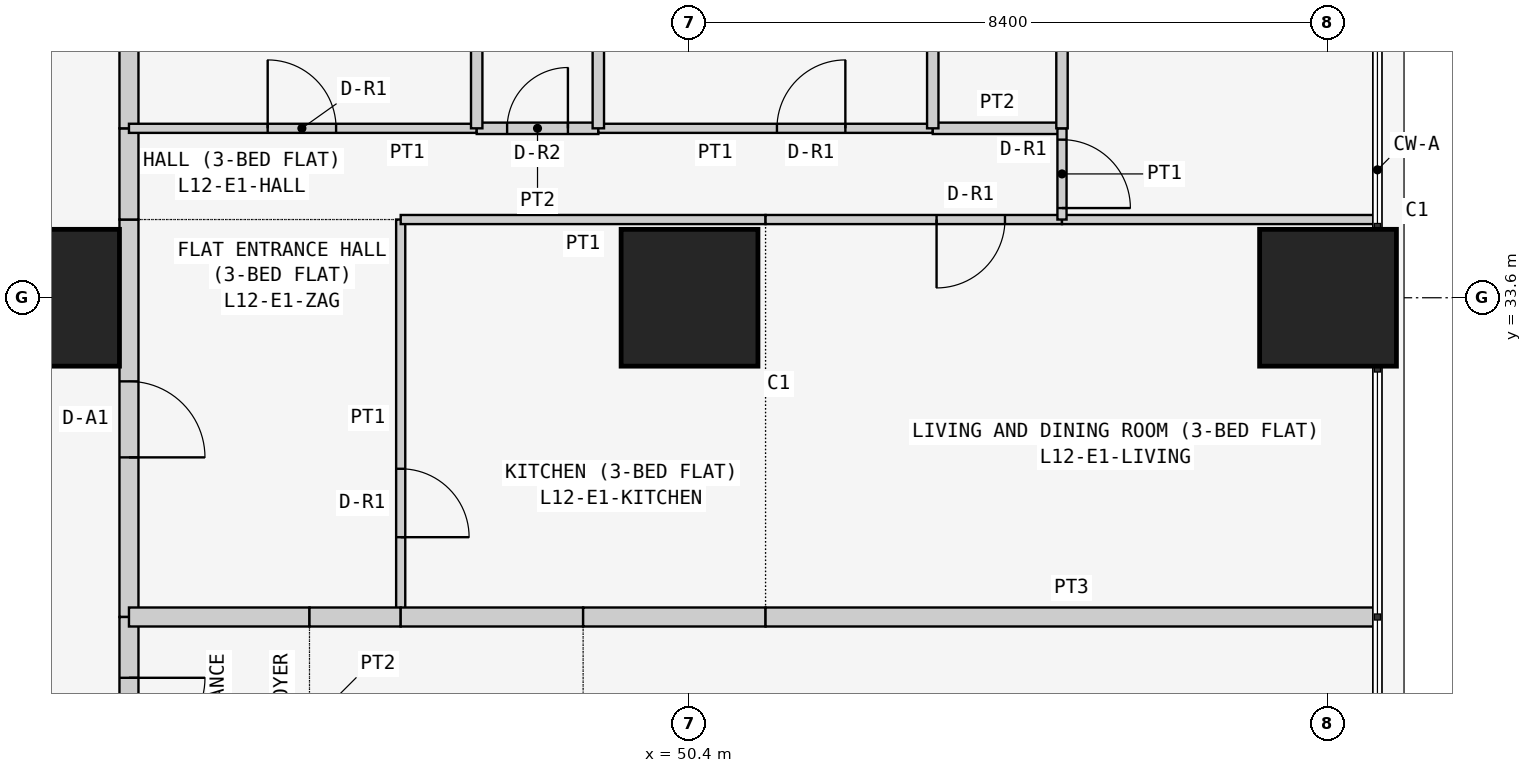
"""IFC4 building model, lengths in metres.
Left out: names, types, materials, properties, quantities, classifications, styles, units other than length and angle.
Written with IfcOpenShell. Run it as: python <this file> out.ifc"""

import sys

from ifc_helpers import new_model, si_unit, direction, frame, frame_2d, origin, origin_2d, place, context, subcontext, project, spatial, rectangle, extrude, element, fill, save


model = new_model("IFC4")
c1 = context("Model", 3, precision=1e-05, world=origin(), true_north=direction((0.0, 1.0)))
c2 = subcontext(c1, "Body", "Model", "MODEL_VIEW")
j1 = project(units=[si_unit("LENGTHUNIT", "METRE"), si_unit("PLANEANGLEUNIT", "RADIAN")], contexts=[c1])
p1 = place(None, origin())
s1 = spatial("IfcSite", under=j1, at=p1, CompositionType="ELEMENT")
p2 = place(p1, origin())
s2 = spatial("IfcBuilding", under=s1, at=p2, CompositionType="ELEMENT")
p3 = place(p2, frame((0.0, 0.0, 52.5)))
s3 = spatial("IfcBuildingStorey", under=s2, at=p3, CompositionType="ELEMENT", Elevation=52.5)
for number, where, z_axis, x_axis in (
    (1, (42.0, 33.6, 0.0), (0.0, 0.0, 1.0), (1.0, 0.0, 0.0)),
    (2, (50.4, 33.6, 0.0), (0.0, 0.0, 1.0), (1.0, 0.0, 0.0)),
    (3, (58.8, 33.6, 0.0), (0.0, 0.0, 1.0), (1.0, 0.0, 0.0)),
):
    element("IfcColumn", number, at=place(p3, frame(where, z_axis=z_axis, x_axis=x_axis)), inside=s3, PredefinedType="COLUMN", context=c2, shape_type="SweptSolid", body=[
        extrude(rectangle(XDim=1.8, YDim=1.8, at=origin_2d()), origin(), (0.0, 0.0, 1.0), 3.6),
    ])
p4 = place(p3, frame((43.025, 34.629, 0.0), z_axis=(0.0, 0.0, 1.0), x_axis=(0.0, -1.0, 0.0)))
e4 = element("IfcWall", 4, at=p4, inside=s3, PredefinedType="PARTITIONING", context=c2, shape_type="SweptSolid", body=[
    extrude(rectangle(XDim=5.229, YDim=0.25, at=frame_2d((2.615, 0.0))), origin(), (0.0, 0.0, 1.0), 3.45),
])
p5 = place(p4, frame((2.129, 0.0, 0.0)))
e5 = element("IfcOpeningElement", 5, at=p5, cuts=e4, PredefinedType="OPENING", context=c2, shape_type="SweptSolid", body=[
    extrude(rectangle(XDim=1.0, YDim=2.1, at=frame_2d((0.5, 1.05))), frame((0.0, 0.135, 0.0), z_axis=(0.0, -1.0, 0.0), x_axis=(1.0, 0.0, 0.0)), (0.0, 0.0, 1.0), 0.27),
])
p6 = place(p3, frame((43.025, 35.829, 0.0), z_axis=(0.0, 0.0, 1.0), x_axis=(0.0, -1.0, 0.0)))
e6 = element("IfcWall", 6, at=p6, inside=s3, PredefinedType="PARTITIONING", context=c2, shape_type="SweptSolid", body=[
    extrude(rectangle(XDim=1.2, YDim=0.25, at=frame_2d((0.6, 0.0))), origin(), (0.0, 0.0, 1.0), 3.45),
])
p7 = place(p3, frame((43.025, 42.7, 0.0), z_axis=(0.0, 0.0, 1.0), x_axis=(0.0, -1.0, 0.0)))
e7 = element("IfcWall", 7, at=p7, inside=s3, PredefinedType="PARTITIONING", context=c2, shape_type="SweptSolid", body=[
    extrude(rectangle(XDim=6.871, YDim=0.25, at=frame_2d((3.436, 0.0))), origin(), (0.0, 0.0, 1.0), 3.45),
])
p8 = place(p3, frame((43.025, 29.4, 0.0), z_axis=(0.0, 0.0, 1.0), x_axis=(0.0, -1.0, 0.0)))
e8 = element("IfcWall", 8, at=p8, inside=s3, PredefinedType="PARTITIONING", context=c2, shape_type="SweptSolid", body=[
    extrude(rectangle(XDim=2.6, YDim=0.25, at=frame_2d((1.3, 0.0))), origin(), (0.0, 0.0, 1.0), 3.45),
])
p9 = place(p8, frame((0.8, 0.0, 0.0)))
e9 = element("IfcOpeningElement", 9, at=p9, cuts=e8, PredefinedType="OPENING", context=c2, shape_type="SweptSolid", body=[
    extrude(rectangle(XDim=1.0, YDim=2.1, at=frame_2d((0.5, 1.05))), frame((0.0, 0.135, 0.0), z_axis=(0.0, -1.0, 0.0), x_axis=(1.0, 0.0, 0.0)), (0.0, 0.0, 1.0), 0.27),
])
p10 = place(p3, frame((46.6, 29.4, 0.0), z_axis=(0.0, 0.0, 1.0), x_axis=(0.0, 1.0, 0.0)))
e10 = element("IfcWall", 10, at=p10, inside=s3, PredefinedType="PARTITIONING", context=c2, shape_type="SweptSolid", body=[
    extrude(rectangle(XDim=5.229, YDim=0.12, at=frame_2d((2.615, 0.0))), origin(), (0.0, 0.0, 1.0), 3.45),
])
p11 = place(p10, frame((1.05, 0.0, 0.0)))
e11 = element("IfcOpeningElement", 11, at=p11, cuts=e10, PredefinedType="OPENING", context=c2, shape_type="SweptSolid", body=[
    extrude(rectangle(XDim=0.9, YDim=2.1, at=frame_2d((0.45, 1.05))), frame((0.0, 0.07, 0.0), z_axis=(0.0, -1.0, 0.0), x_axis=(1.0, 0.0, 0.0)), (0.0, 0.0, 1.0), 0.14),
])
p12 = place(p3, frame((43.025, 29.4, 0.0), z_axis=(0.0, 0.0, 1.0), x_axis=(1.0, 0.0, 0.0)))
e12 = element("IfcWall", 12, at=p12, inside=s3, PredefinedType="PARTITIONING", context=c2, shape_type="SweptSolid", body=[
    extrude(rectangle(XDim=2.375, YDim=0.25, at=frame_2d((1.188, 0.0))), origin(), (0.0, 0.0, 1.0), 3.45),
])
p13 = place(p3, frame((45.4, 29.4, 0.0), z_axis=(0.0, 0.0, 1.0), x_axis=(1.0, 0.0, 0.0)))
e13 = element("IfcWall", 13, at=p13, inside=s3, PredefinedType="PARTITIONING", context=c2, shape_type="SweptSolid", body=[
    extrude(rectangle(XDim=1.2, YDim=0.25, at=frame_2d((0.6, 0.0))), origin(), (0.0, 0.0, 1.0), 3.45),
])
p14 = place(p3, frame((51.4, 34.629, 0.0), z_axis=(0.0, 0.0, 1.0), x_axis=(-1.0, 0.0, 0.0)))
e14 = element("IfcWall", 14, at=p14, inside=s3, PredefinedType="PARTITIONING", context=c2, shape_type="SweptSolid", body=[
    extrude(rectangle(XDim=4.8, YDim=0.12, at=frame_2d((2.4, 0.0))), origin(), (0.0, 0.0, 1.0), 3.45),
])
for number, where, z_axis, x_axis in (
    (15, (46.6, 29.4, 0.0), (0.0, 0.0, 1.0), (1.0, 0.0, 0.0)),
    (16, (49.0, 29.4, 0.0), (0.0, 0.0, 1.0), (1.0, 0.0, 0.0)),
):
    element("IfcWall", number, at=place(p3, frame(where, z_axis=z_axis, x_axis=x_axis)), inside=s3, PredefinedType="PARTITIONING", context=c2, shape_type="SweptSolid", body=[
        extrude(rectangle(XDim=2.4, YDim=0.25, at=frame_2d((1.2, 0.0))), origin(), (0.0, 0.0, 1.0), 3.45),
    ])
p15 = place(p3, frame((55.3, 34.629, 0.0), z_axis=(0.0, 0.0, 1.0), x_axis=(-1.0, 0.0, 0.0)))
e17 = element("IfcWall", 17, at=p15, inside=s3, PredefinedType="PARTITIONING", context=c2, shape_type="SweptSolid", body=[
    extrude(rectangle(XDim=3.9, YDim=0.12, at=frame_2d((1.95, 0.0))), origin(), (0.0, 0.0, 1.0), 3.45),
])
p16 = place(p15, frame((0.75, 0.0, 0.0)))
e18 = element("IfcOpeningElement", 18, at=p16, cuts=e17, PredefinedType="OPENING", context=c2, shape_type="SweptSolid", body=[
    extrude(rectangle(XDim=0.9, YDim=2.1, at=frame_2d((0.45, 1.05))), frame((0.0, 0.07, 0.0), z_axis=(0.0, -1.0, 0.0), x_axis=(1.0, 0.0, 0.0)), (0.0, 0.0, 1.0), 0.14),
])
p17 = place(p3, frame((59.45, 34.629, 0.0), z_axis=(0.0, 0.0, 1.0), x_axis=(-1.0, 0.0, 0.0)))
e19 = element("IfcWall", 19, at=p17, inside=s3, PredefinedType="PARTITIONING", context=c2, shape_type="SweptSolid", body=[
    extrude(rectangle(XDim=4.15, YDim=0.12, at=frame_2d((2.075, 0.0))), origin(), (0.0, 0.0, 1.0), 3.45),
])
p18 = place(p3, frame((51.4, 29.4, 0.0), z_axis=(0.0, 0.0, 1.0), x_axis=(1.0, 0.0, 0.0)))
e20 = element("IfcWall", 20, at=p18, inside=s3, PredefinedType="PARTITIONING", context=c2, shape_type="SweptSolid", body=[
    extrude(rectangle(XDim=8.05, YDim=0.25, at=frame_2d((4.025, 0.0))), origin(), (0.0, 0.0, 1.0), 3.45),
])
p19 = place(p3, frame((47.6, 35.829, 0.0), z_axis=(0.0, 0.0, 1.0), x_axis=(-1.0, 0.0, 0.0)))
e21 = element("IfcWall", 21, at=p19, inside=s3, PredefinedType="PARTITIONING", context=c2, shape_type="SweptSolid", body=[
    extrude(rectangle(XDim=4.575, YDim=0.12, at=frame_2d((2.288, 0.0))), origin(), (0.0, 0.0, 1.0), 3.45),
])
p20 = place(p19, frame((1.85, 0.0, 0.0)))
e22 = element("IfcOpeningElement", 22, at=p20, cuts=e21, PredefinedType="OPENING", context=c2, shape_type="SweptSolid", body=[
    extrude(rectangle(XDim=0.9, YDim=2.1, at=frame_2d((0.45, 1.05))), frame((0.0, 0.07, 0.0), z_axis=(0.0, -1.0, 0.0), x_axis=(1.0, 0.0, 0.0)), (0.0, 0.0, 1.0), 0.14),
])
p21 = place(p3, frame((49.2, 35.829, 0.0), z_axis=(0.0, 0.0, 1.0), x_axis=(-1.0, 0.0, 0.0)))
e23 = element("IfcWall", 23, at=p21, inside=s3, PredefinedType="PARTITIONING", context=c2, shape_type="SweptSolid", body=[
    extrude(rectangle(XDim=1.6, YDim=0.15, at=frame_2d((0.8, 0.0))), origin(), (0.0, 0.0, 1.0), 3.45),
])
p22 = place(p21, frame((0.4, 0.0, 0.0)))
e24 = element("IfcOpeningElement", 24, at=p22, cuts=e23, PredefinedType="OPENING", context=c2, shape_type="SweptSolid", body=[
    extrude(rectangle(XDim=0.8, YDim=2.1, at=frame_2d((0.4, 1.05))), frame((0.0, 0.085, 0.0), z_axis=(0.0, -1.0, 0.0), x_axis=(1.0, 0.0, 0.0)), (0.0, 0.0, 1.0), 0.17),
])
p23 = place(p3, frame((53.6, 35.829, 0.0), z_axis=(0.0, 0.0, 1.0), x_axis=(-1.0, 0.0, 0.0)))
e25 = element("IfcWall", 25, at=p23, inside=s3, PredefinedType="PARTITIONING", context=c2, shape_type="SweptSolid", body=[
    extrude(rectangle(XDim=4.4, YDim=0.12, at=frame_2d((2.2, 0.0))), origin(), (0.0, 0.0, 1.0), 3.45),
])
p24 = place(p23, frame((1.15, 0.0, 0.0)))
e26 = element("IfcOpeningElement", 26, at=p24, cuts=e25, PredefinedType="OPENING", context=c2, shape_type="SweptSolid", body=[
    extrude(rectangle(XDim=0.9, YDim=2.1, at=frame_2d((0.45, 1.05))), frame((0.0, 0.07, 0.0), z_axis=(0.0, -1.0, 0.0), x_axis=(1.0, 0.0, 0.0)), (0.0, 0.0, 1.0), 0.14),
])
p25 = place(p3, frame((55.3, 35.829, 0.0), z_axis=(0.0, 0.0, 1.0), x_axis=(-1.0, 0.0, 0.0)))
e27 = element("IfcWall", 27, at=p25, inside=s3, PredefinedType="PARTITIONING", context=c2, shape_type="SweptSolid", body=[
    extrude(rectangle(XDim=1.7, YDim=0.15, at=frame_2d((0.85, 0.0))), origin(), (0.0, 0.0, 1.0), 3.45),
])
p26 = place(p3, frame((55.3, 34.629, 0.0), z_axis=(0.0, 0.0, 1.0), x_axis=(0.0, 1.0, 0.0)))
e28 = element("IfcWall", 28, at=p26, inside=s3, PredefinedType="PARTITIONING", context=c2, shape_type="SweptSolid", body=[
    extrude(rectangle(XDim=1.2, YDim=0.12, at=frame_2d((0.6, 0.0))), origin(), (0.0, 0.0, 1.0), 3.45),
])
p27 = place(p26, frame((0.151, 0.0, 0.0)))
e29 = element("IfcOpeningElement", 29, at=p27, cuts=e28, PredefinedType="OPENING", context=c2, shape_type="SweptSolid", body=[
    extrude(rectangle(XDim=0.9, YDim=2.1, at=frame_2d((0.45, 1.05))), frame((0.0, 0.07, 0.0), z_axis=(0.0, -1.0, 0.0), x_axis=(1.0, 0.0, 0.0)), (0.0, 0.0, 1.0), 0.14),
])
for number, where, z_axis, x_axis in (
    (30, (47.6, 35.829, 0.0), (0.0, 0.0, 1.0), (0.0, 1.0, 0.0)),
    (31, (49.2, 35.829, 0.0), (0.0, 0.0, 1.0), (0.0, 1.0, 0.0)),
    (32, (53.6, 35.829, 0.0), (0.0, 0.0, 1.0), (0.0, 1.0, 0.0)),
):
    element("IfcWall", number, at=place(p3, frame(where, z_axis=z_axis, x_axis=x_axis)), inside=s3, PredefinedType="PARTITIONING", context=c2, shape_type="SweptSolid", body=[
        extrude(rectangle(XDim=6.871, YDim=0.15, at=frame_2d((3.436, 0.0))), origin(), (0.0, 0.0, 1.0), 3.45),
    ])
p28 = place(p3, frame((55.3, 35.829, 0.0), z_axis=(0.0, 0.0, 1.0), x_axis=(0.0, 1.0, 0.0)))
e33 = element("IfcWall", 33, at=p28, inside=s3, PredefinedType="PARTITIONING", context=c2, shape_type="SweptSolid", body=[
    extrude(rectangle(XDim=6.871, YDim=0.15, at=frame_2d((3.436, 0.0))), origin(), (0.0, 0.0, 1.0), 3.45),
])
p29 = place(p28, frame((3.171, 0.0, 0.0)))
e34 = element("IfcOpeningElement", 34, at=p29, cuts=e33, PredefinedType="OPENING", context=c2, shape_type="SweptSolid", body=[
    extrude(rectangle(XDim=0.8, YDim=2.1, at=frame_2d((0.4, 1.05))), frame((0.0, 0.085, 0.0), z_axis=(0.0, -1.0, 0.0), x_axis=(1.0, 0.0, 0.0)), (0.0, 0.0, 1.0), 0.17),
])
p30 = place(p5, origin())
e35 = element("IfcDoor", 35, at=p30, inside=s3, OperationType="SINGLE_SWING_RIGHT", PredefinedType="DOOR", context=c2, shape_type="SweptSolid", body=[
    extrude(rectangle(XDim=1.0, YDim=2.1, at=frame_2d((0.5, 1.05))), frame((0.0, 0.025, 0.0), z_axis=(0.0, -1.0, 0.0), x_axis=(1.0, 0.0, 0.0)), (0.0, 0.0, 1.0), 0.05),
])
fill(e5, e35)
p31 = place(p11, frame((0.9, 0.0, 0.0), z_axis=(0.0, 0.0, 1.0), x_axis=(-1.0, 0.0, 0.0)))
e36 = element("IfcDoor", 36, at=p31, inside=s3, OperationType="SINGLE_SWING_RIGHT", PredefinedType="DOOR", context=c2, shape_type="SweptSolid", body=[
    extrude(rectangle(XDim=0.9, YDim=2.1, at=frame_2d((0.45, 1.05))), frame((0.0, 0.025, 0.0), z_axis=(0.0, -1.0, 0.0), x_axis=(1.0, 0.0, 0.0)), (0.0, 0.0, 1.0), 0.05),
])
fill(e11, e36)
p32 = place(p16, origin())
e37 = element("IfcDoor", 37, at=p32, inside=s3, OperationType="SINGLE_SWING_RIGHT", PredefinedType="DOOR", context=c2, shape_type="SweptSolid", body=[
    extrude(rectangle(XDim=0.9, YDim=2.1, at=frame_2d((0.45, 1.05))), frame((0.0, 0.025, 0.0), z_axis=(0.0, -1.0, 0.0), x_axis=(1.0, 0.0, 0.0)), (0.0, 0.0, 1.0), 0.05),
])
fill(e18, e37)
p33 = place(p20, frame((0.9, 0.0, 0.0), z_axis=(0.0, 0.0, 1.0), x_axis=(-1.0, 0.0, 0.0)))
e38 = element("IfcDoor", 38, at=p33, inside=s3, OperationType="SINGLE_SWING_LEFT", PredefinedType="DOOR", context=c2, shape_type="SweptSolid", body=[
    extrude(rectangle(XDim=0.9, YDim=2.1, at=frame_2d((0.45, 1.05))), frame((0.0, 0.025, 0.0), z_axis=(0.0, -1.0, 0.0), x_axis=(1.0, 0.0, 0.0)), (0.0, 0.0, 1.0), 0.05),
])
fill(e22, e38)
p34 = place(p22, frame((0.8, 0.0, 0.0), z_axis=(0.0, 0.0, 1.0), x_axis=(-1.0, 0.0, 0.0)))
e39 = element("IfcDoor", 39, at=p34, inside=s3, OperationType="SINGLE_SWING_RIGHT", PredefinedType="DOOR", context=c2, shape_type="SweptSolid", body=[
    extrude(rectangle(XDim=0.8, YDim=2.1, at=frame_2d((0.4, 1.05))), frame((0.0, 0.025, 0.0), z_axis=(0.0, -1.0, 0.0), x_axis=(1.0, 0.0, 0.0)), (0.0, 0.0, 1.0), 0.05),
])
fill(e24, e39)
p35 = place(p24, frame((0.9, 0.0, 0.0), z_axis=(0.0, 0.0, 1.0), x_axis=(-1.0, 0.0, 0.0)))
e40 = element("IfcDoor", 40, at=p35, inside=s3, OperationType="SINGLE_SWING_RIGHT", PredefinedType="DOOR", context=c2, shape_type="SweptSolid", body=[
    extrude(rectangle(XDim=0.9, YDim=2.1, at=frame_2d((0.45, 1.05))), frame((0.0, 0.025, 0.0), z_axis=(0.0, -1.0, 0.0), x_axis=(1.0, 0.0, 0.0)), (0.0, 0.0, 1.0), 0.05),
])
fill(e26, e40)
p36 = place(p27, frame((0.9, 0.0, 0.0), z_axis=(0.0, 0.0, 1.0), x_axis=(-1.0, 0.0, 0.0)))
e41 = element("IfcDoor", 41, at=p36, inside=s3, OperationType="SINGLE_SWING_RIGHT", PredefinedType="DOOR", context=c2, shape_type="SweptSolid", body=[
    extrude(rectangle(XDim=0.9, YDim=2.1, at=frame_2d((0.45, 1.05))), frame((0.0, 0.025, 0.0), z_axis=(0.0, -1.0, 0.0), x_axis=(1.0, 0.0, 0.0)), (0.0, 0.0, 1.0), 0.05),
])
fill(e29, e41)
p37 = place(p9, origin())
e42 = element("IfcDoor", 42, at=p37, inside=s3, OperationType="SINGLE_SWING_LEFT", PredefinedType="DOOR", context=c2, shape_type="SweptSolid", body=[
    extrude(rectangle(XDim=1.0, YDim=2.1, at=frame_2d((0.5, 1.05))), frame((0.0, 0.025, 0.0), z_axis=(0.0, -1.0, 0.0), x_axis=(1.0, 0.0, 0.0)), (0.0, 0.0, 1.0), 0.05),
])
fill(e9, e42)
save(model, sys.argv[1])
